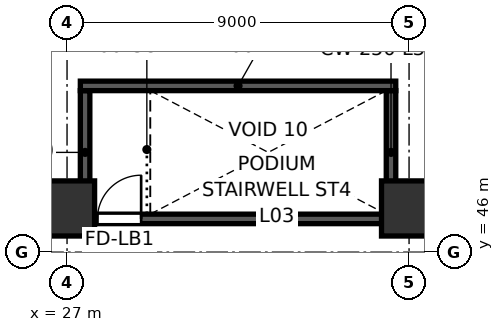
"""IFC4 building model, lengths in metres.
Left out: names, types, materials, properties, quantities, classifications, styles, units other than length and angle.
Written with IfcOpenShell. Run it as: python <this file> out.ifc"""

import sys

from ifc_helpers import new_model, si_unit, direction, frame, frame_2d, origin, origin_2d, place, context, subcontext, project, spatial, rectangle, extrude, source, transform, mapped, element, fill, save


model = new_model("IFC4")
c1 = context("Model", 3, precision=1e-05, world=origin(), true_north=direction((0.0, 1.0)))
c2 = subcontext(c1, "Body", "Model", "MODEL_VIEW")
j1 = project(units=[si_unit("LENGTHUNIT", "METRE"), si_unit("PLANEANGLEUNIT", "RADIAN")], contexts=[c1])
p1 = place(None, origin())
s1 = spatial("IfcSite", under=j1, at=p1, CompositionType="ELEMENT")
p2 = place(p1, origin())
s2 = spatial("IfcBuilding", under=s1, at=p2, CompositionType="ELEMENT")
p3 = place(p2, frame((0.0, 0.0, 12.0)))
s3 = spatial("IfcBuildingStorey", under=s2, at=p3, CompositionType="ELEMENT", Elevation=12.0)
m1 = source(origin(), c2, "Body", "SweptSolid", [
    extrude(rectangle(XDim=1.6, YDim=1.6, at=origin_2d()), origin(), (0.0, 0.0, 1.0), 5.398),
])
p4 = place(p3, frame((27.0, 52.0, 0.001), z_axis=(0.0, 0.0, 1.0), x_axis=(1.0, 0.0, 0.0)))
e1 = element("IfcColumn", 1, at=p4, inside=s3, PredefinedType="COLUMN", context=c2, shape_type="MappedRepresentation", body=[
    mapped(m1, transform((0.0, 0.0, 0.0), scale=1.0)),
])
m2 = source(origin(), c2, "Body", "SweptSolid", [
    extrude(rectangle(XDim=1.45, YDim=1.45, at=origin_2d()), origin(), (0.0, 0.0, 1.0), 5.398),
])
p5 = place(p3, frame((27.0, 47.15, 0.001), z_axis=(0.0, 0.0, 1.0), x_axis=(1.0, 0.0, 0.0)))
e2 = element("IfcColumn", 2, at=p5, inside=s3, PredefinedType="COLUMN", context=c2, shape_type="MappedRepresentation", body=[
    mapped(m2, transform((0.0, 0.0, 0.0), scale=1.0)),
])
p6 = place(p3, frame((36.0, 52.0, 0.001), z_axis=(0.0, 0.0, 1.0), x_axis=(1.0, 0.0, 0.0)))
e3 = element("IfcColumn", 3, at=p6, inside=s3, PredefinedType="COLUMN", context=c2, shape_type="MappedRepresentation", body=[
    mapped(m1, transform((0.0, 0.0, 0.0), scale=1.0)),
])
p7 = place(p3, frame((36.0, 47.15, 0.001), z_axis=(0.0, 0.0, 1.0), x_axis=(1.0, 0.0, 0.0)))
e4 = element("IfcColumn", 4, at=p7, inside=s3, PredefinedType="COLUMN", context=c2, shape_type="MappedRepresentation", body=[
    mapped(m2, transform((0.0, 0.0, 0.0), scale=1.0)),
])
for number, where, z_axis, x_axis in (
    (5, (27.475, 47.0, 0.0), (0.0, 0.0, 1.0), (0.0, 1.0, 0.0)),
    (6, (35.525, 47.0, 0.0), (0.0, 0.0, 1.0), (0.0, 1.0, 0.0)),
):
    element("IfcWall", number, at=place(p3, frame(where, z_axis=z_axis, x_axis=x_axis)), inside=s3, PredefinedType="SHEAR", context=c2, shape_type="SweptSolid", body=[
        extrude(rectangle(XDim=3.25, YDim=0.25, at=frame_2d((1.625, 0.0))), origin(), (0.0, 0.0, 1.0), 5.14),
    ])
p8 = place(p3, frame((27.35, 46.875, 0.0), z_axis=(0.0, 0.0, 1.0), x_axis=(1.0, 0.0, 0.0)))
e7 = element("IfcWall", 7, at=p8, inside=s3, PredefinedType="SHEAR", context=c2, shape_type="SweptSolid", body=[
    extrude(rectangle(XDim=8.3, YDim=0.25, at=frame_2d((4.15, 0.0))), origin(), (0.0, 0.0, 1.0), 5.14),
])
p9 = place(p8, frame((0.45, 0.0, 0.0)))
e8 = element("IfcOpeningElement", 8, at=p9, cuts=e7, PredefinedType="OPENING", context=c2, shape_type="SweptSolid", body=[
    extrude(rectangle(XDim=1.15, YDim=2.2, at=frame_2d((0.575, 1.1))), frame((0.0, 0.135, 0.0), z_axis=(0.0, -1.0, 0.0), x_axis=(1.0, 0.0, 0.0)), (0.0, 0.0, 1.0), 0.27),
])
p10 = place(p3, frame((27.35, 50.375, 0.0), z_axis=(0.0, 0.0, 1.0), x_axis=(1.0, 0.0, 0.0)))
e9 = element("IfcWall", 9, at=p10, inside=s3, PredefinedType="SHEAR", context=c2, shape_type="SweptSolid", body=[
    extrude(rectangle(XDim=8.3, YDim=0.25, at=frame_2d((4.15, 0.0))), origin(), (0.0, 0.0, 1.0), 5.14),
])
m3 = source(origin(), c2, "Body", "SweptSolid", [
    extrude(rectangle(XDim=1.15, YDim=2.2, at=frame_2d((0.575, 1.1))), frame((0.0, 0.025, 0.0), z_axis=(0.0, -1.0, 0.0), x_axis=(1.0, 0.0, 0.0)), (0.0, 0.0, 1.0), 0.05),
])
p11 = place(p9, origin())
e10 = element("IfcDoor", 10, at=p11, inside=s3, OperationType="SINGLE_SWING_RIGHT", PredefinedType="DOOR", context=c2, shape_type="MappedRepresentation", body=[
    mapped(m3, transform((0.0, 0.0, 0.0), scale=1.0)),
])
fill(e8, e10)
save(model, sys.argv[1])
